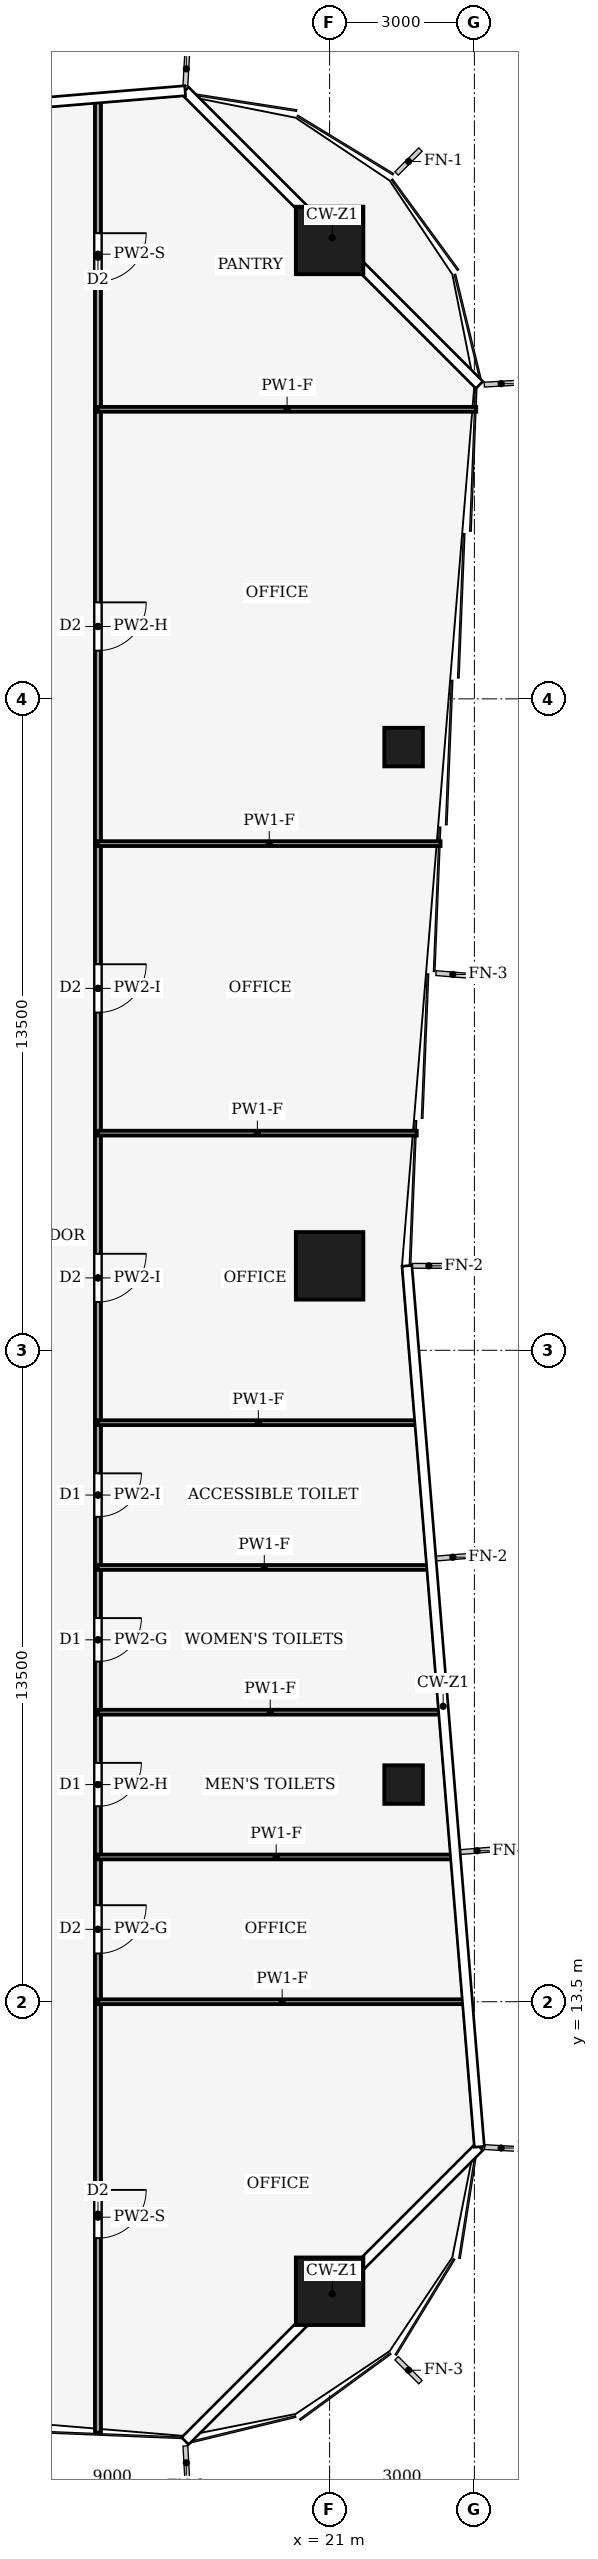
"""IFC4 building model, lengths in metres.
Left out: names, types, materials, properties, quantities, classifications, styles, units other than length and angle.
Written with IfcOpenShell. Run it as: python <this file> out.ifc"""

import sys

from ifc_helpers import new_model, si_unit, direction, frame, frame_2d, origin, origin_2d, place, context, subcontext, project, spatial, rectangle, hollow_rectangle, extrude, element, fill, save


model = new_model("IFC4")
c1 = context("Model", 3, precision=1e-05, world=origin(), true_north=direction((0.0, 1.0)))
c2 = subcontext(c1, "Body", "Model", "MODEL_VIEW")
j1 = project(units=[si_unit("LENGTHUNIT", "METRE"), si_unit("PLANEANGLEUNIT", "RADIAN")], contexts=[c1])
p1 = place(None, origin())
s1 = spatial("IfcSite", under=j1, at=p1, CompositionType="ELEMENT")
p2 = place(p1, origin())
s2 = spatial("IfcBuilding", under=s1, at=p2, CompositionType="ELEMENT")
p3 = place(p2, frame((0.0, 0.0, 82.0)))
s3 = spatial("IfcBuildingStorey", under=s2, at=p3, CompositionType="ELEMENT", Elevation=82.0)
for number, where, z_axis, x_axis in (
    (1, (21.0, 50.0, 0.0), (0.0, 0.0, 1.0), (1.0, 0.0, 0.0)),
    (2, (21.0, 28.75, 0.0), (0.0, 0.0, 1.0), (1.0, 0.0, 0.0)),
    (3, (21.0, 7.5, 0.0), (0.0, 0.0, 1.0), (1.0, 0.0, 0.0)),
):
    element("IfcColumn", number, at=place(p3, frame(where, z_axis=z_axis, x_axis=x_axis)), inside=s3, PredefinedType="COLUMN", context=c2, shape_type="SweptSolid", body=[
        extrude(hollow_rectangle(XDim=1.4, YDim=1.4, WallThickness=0.08, at=origin_2d()), origin(), (0.0, 0.0, 1.0), 4.0),
    ])
for number, where, z_axis, x_axis in (
    (4, (22.534, 18.0, 0.0), (0.0, 0.0, 1.0), (1.0, 0.0, 0.0)),
    (5, (22.534, 39.5, 0.0), (0.0, 0.0, 1.0), (1.0, 0.0, 0.0)),
):
    element("IfcColumn", number, at=place(p3, frame(where, z_axis=z_axis, x_axis=x_axis)), inside=s3, PredefinedType="COLUMN", context=c2, shape_type="SweptSolid", body=[
        extrude(hollow_rectangle(XDim=0.8, YDim=0.8, WallThickness=0.04, at=origin_2d()), origin(), (0.0, 0.0, 1.0), 4.0),
    ])
p4 = place(p3, frame((16.2, 13.5, 0.0), z_axis=(0.0, 0.0, 1.0), x_axis=(0.0, -1.0, 0.0)))
e6 = element("IfcWall", 6, at=p4, inside=s3, PredefinedType="PARTITIONING", context=c2, shape_type="SweptSolid", body=[
    extrude(rectangle(XDim=8.93, YDim=0.125, at=frame_2d((4.465, 0.0))), origin(), (0.0, 0.0, 1.0), 3.04),
])
p5 = place(p4, frame((3.9, 0.0, 0.0)))
e7 = element("IfcOpeningElement", 7, at=p5, cuts=e6, PredefinedType="OPENING", context=c2, shape_type="SweptSolid", body=[
    extrude(rectangle(XDim=1.0, YDim=2.1, at=frame_2d((0.5, 1.05))), frame((0.0, 0.073, 0.0), z_axis=(0.0, -1.0, 0.0), x_axis=(1.0, 0.0, 0.0)), (0.0, 0.0, 1.0), 0.145),
])
p6 = place(p3, frame((16.2, 16.5, 0.0), z_axis=(0.0, 0.0, 1.0), x_axis=(0.0, -1.0, 0.0)))
e8 = element("IfcWall", 8, at=p6, inside=s3, PredefinedType="PARTITIONING", context=c2, shape_type="SweptSolid", body=[
    extrude(rectangle(XDim=3.0, YDim=0.125, at=frame_2d((1.5, 0.0))), origin(), (0.0, 0.0, 1.0), 3.87),
])
p7 = place(p6, frame((1.0, 0.0, 0.0)))
e9 = element("IfcOpeningElement", 9, at=p7, cuts=e8, PredefinedType="OPENING", context=c2, shape_type="SweptSolid", body=[
    extrude(rectangle(XDim=1.0, YDim=2.1, at=frame_2d((0.5, 1.05))), frame((0.0, 0.073, 0.0), z_axis=(0.0, -1.0, 0.0), x_axis=(1.0, 0.0, 0.0)), (0.0, 0.0, 1.0), 0.145),
])
p8 = place(p3, frame((16.2, 19.5, 0.0), z_axis=(0.0, 0.0, 1.0), x_axis=(0.0, -1.0, 0.0)))
e10 = element("IfcWall", 10, at=p8, inside=s3, PredefinedType="PARTITIONING", context=c2, shape_type="SweptSolid", body=[
    extrude(rectangle(XDim=3.0, YDim=0.125, at=frame_2d((1.5, 0.0))), origin(), (0.0, 0.0, 1.0), 3.14),
])
p9 = place(p8, frame((1.05, 0.0, 0.0)))
e11 = element("IfcOpeningElement", 11, at=p9, cuts=e10, PredefinedType="OPENING", context=c2, shape_type="SweptSolid", body=[
    extrude(rectangle(XDim=0.9, YDim=2.1, at=frame_2d((0.45, 1.05))), frame((0.0, 0.073, 0.0), z_axis=(0.0, -1.0, 0.0), x_axis=(1.0, 0.0, 0.0)), (0.0, 0.0, 1.0), 0.145),
])
p10 = place(p3, frame((16.2, 22.5, 0.0), z_axis=(0.0, 0.0, 1.0), x_axis=(0.0, -1.0, 0.0)))
e12 = element("IfcWall", 12, at=p10, inside=s3, PredefinedType="PARTITIONING", context=c2, shape_type="SweptSolid", body=[
    extrude(rectangle(XDim=3.0, YDim=0.125, at=frame_2d((1.5, 0.0))), origin(), (0.0, 0.0, 1.0), 3.87),
])
p11 = place(p10, frame((1.05, 0.0, 0.0)))
e13 = element("IfcOpeningElement", 13, at=p11, cuts=e12, PredefinedType="OPENING", context=c2, shape_type="SweptSolid", body=[
    extrude(rectangle(XDim=0.9, YDim=2.1, at=frame_2d((0.45, 1.05))), frame((0.0, 0.073, 0.0), z_axis=(0.0, -1.0, 0.0), x_axis=(1.0, 0.0, 0.0)), (0.0, 0.0, 1.0), 0.145),
])
p12 = place(p3, frame((16.2, 25.5, 0.0), z_axis=(0.0, 0.0, 1.0), x_axis=(0.0, -1.0, 0.0)))
e14 = element("IfcWall", 14, at=p12, inside=s3, PredefinedType="PARTITIONING", context=c2, shape_type="SweptSolid", body=[
    extrude(rectangle(XDim=3.0, YDim=0.125, at=frame_2d((1.5, 0.0))), origin(), (0.0, 0.0, 1.0), 3.48),
])
p13 = place(p12, frame((1.05, 0.0, 0.0)))
e15 = element("IfcOpeningElement", 15, at=p13, cuts=e14, PredefinedType="OPENING", context=c2, shape_type="SweptSolid", body=[
    extrude(rectangle(XDim=0.9, YDim=2.1, at=frame_2d((0.45, 1.05))), frame((0.0, 0.073, 0.0), z_axis=(0.0, -1.0, 0.0), x_axis=(1.0, 0.0, 0.0)), (0.0, 0.0, 1.0), 0.145),
])
p14 = place(p3, frame((16.2, 31.5, 0.0), z_axis=(0.0, 0.0, 1.0), x_axis=(0.0, -1.0, 0.0)))
e16 = element("IfcWall", 16, at=p14, inside=s3, PredefinedType="PARTITIONING", context=c2, shape_type="SweptSolid", body=[
    extrude(rectangle(XDim=6.0, YDim=0.125, at=frame_2d((3.0, 0.0))), origin(), (0.0, 0.0, 1.0), 3.48),
])
p15 = place(p14, frame((2.5, 0.0, 0.0)))
e17 = element("IfcOpeningElement", 17, at=p15, cuts=e16, PredefinedType="OPENING", context=c2, shape_type="SweptSolid", body=[
    extrude(rectangle(XDim=1.0, YDim=2.1, at=frame_2d((0.5, 1.05))), frame((0.0, 0.073, 0.0), z_axis=(0.0, -1.0, 0.0), x_axis=(1.0, 0.0, 0.0)), (0.0, 0.0, 1.0), 0.145),
])
p16 = place(p3, frame((16.2, 37.5, 0.0), z_axis=(0.0, 0.0, 1.0), x_axis=(0.0, -1.0, 0.0)))
e18 = element("IfcWall", 18, at=p16, inside=s3, PredefinedType="PARTITIONING", context=c2, shape_type="SweptSolid", body=[
    extrude(rectangle(XDim=6.0, YDim=0.125, at=frame_2d((3.0, 0.0))), origin(), (0.0, 0.0, 1.0), 3.48),
])
p17 = place(p16, frame((2.5, 0.0, 0.0)))
e19 = element("IfcOpeningElement", 19, at=p17, cuts=e18, PredefinedType="OPENING", context=c2, shape_type="SweptSolid", body=[
    extrude(rectangle(XDim=1.0, YDim=2.1, at=frame_2d((0.5, 1.05))), frame((0.0, 0.073, 0.0), z_axis=(0.0, -1.0, 0.0), x_axis=(1.0, 0.0, 0.0)), (0.0, 0.0, 1.0), 0.145),
])
p18 = place(p3, frame((16.2, 46.5, 0.0), z_axis=(0.0, 0.0, 1.0), x_axis=(0.0, -1.0, 0.0)))
e20 = element("IfcWall", 20, at=p18, inside=s3, PredefinedType="PARTITIONING", context=c2, shape_type="SweptSolid", body=[
    extrude(rectangle(XDim=9.0, YDim=0.125, at=frame_2d((4.5, 0.0))), origin(), (0.0, 0.0, 1.0), 3.14),
])
p19 = place(p18, frame((4.0, 0.0, 0.0)))
e21 = element("IfcOpeningElement", 21, at=p19, cuts=e20, PredefinedType="OPENING", context=c2, shape_type="SweptSolid", body=[
    extrude(rectangle(XDim=1.0, YDim=2.1, at=frame_2d((0.5, 1.05))), frame((0.0, 0.073, 0.0), z_axis=(0.0, -1.0, 0.0), x_axis=(1.0, 0.0, 0.0)), (0.0, 0.0, 1.0), 0.145),
])
p20 = place(p3, frame((16.2, 52.93, 0.0), z_axis=(0.0, 0.0, 1.0), x_axis=(0.0, -1.0, 0.0)))
e22 = element("IfcWall", 22, at=p20, inside=s3, PredefinedType="PARTITIONING", context=c2, shape_type="SweptSolid", body=[
    extrude(rectangle(XDim=6.43, YDim=0.125, at=frame_2d((3.215, 0.0))), origin(), (0.0, 0.0, 1.0), 3.04),
])
p21 = place(p20, frame((2.78, 0.0, 0.0)))
e23 = element("IfcOpeningElement", 23, at=p21, cuts=e22, PredefinedType="OPENING", context=c2, shape_type="SweptSolid", body=[
    extrude(rectangle(XDim=1.0, YDim=2.1, at=frame_2d((0.5, 1.05))), frame((0.0, 0.073, 0.0), z_axis=(0.0, -1.0, 0.0), x_axis=(1.0, 0.0, 0.0)), (0.0, 0.0, 1.0), 0.145),
])
p22 = place(p3, frame((23.833, 13.5, 0.0), z_axis=(0.0, 0.0, 1.0), x_axis=(-1.0, 0.0, 0.0)))
e24 = element("IfcWall", 24, at=p22, inside=s3, PredefinedType="PARTITIONING", context=c2, shape_type="SweptSolid", body=[
    extrude(rectangle(XDim=7.634, YDim=0.1, at=frame_2d((3.817, 0.0))), origin(), (0.0, 0.0, 1.0), 3.04),
])
p23 = place(p3, frame((23.587, 16.5, 0.0), z_axis=(0.0, 0.0, 1.0), x_axis=(-1.0, 0.0, 0.0)))
e25 = element("IfcWall", 25, at=p23, inside=s3, PredefinedType="PARTITIONING", context=c2, shape_type="SweptSolid", body=[
    extrude(rectangle(XDim=7.387, YDim=0.1, at=frame_2d((3.693, 0.0))), origin(), (0.0, 0.0, 1.0), 3.04),
])
p24 = place(p3, frame((23.34, 19.5, 0.0), z_axis=(0.0, 0.0, 1.0), x_axis=(-1.0, 0.0, 0.0)))
e26 = element("IfcWall", 26, at=p24, inside=s3, PredefinedType="PARTITIONING", context=c2, shape_type="SweptSolid", body=[
    extrude(rectangle(XDim=7.14, YDim=0.1, at=frame_2d((3.57, 0.0))), origin(), (0.0, 0.0, 1.0), 3.04),
])
p25 = place(p3, frame((23.094, 22.5, 0.0), z_axis=(0.0, 0.0, 1.0), x_axis=(-1.0, 0.0, 0.0)))
e27 = element("IfcWall", 27, at=p25, inside=s3, PredefinedType="PARTITIONING", context=c2, shape_type="SweptSolid", body=[
    extrude(rectangle(XDim=6.894, YDim=0.1, at=frame_2d((3.447, 0.0))), origin(), (0.0, 0.0, 1.0), 3.04),
])
p26 = place(p3, frame((22.847, 25.5, 0.0), z_axis=(0.0, 0.0, 1.0), x_axis=(-1.0, 0.0, 0.0)))
e28 = element("IfcWall", 28, at=p26, inside=s3, PredefinedType="PARTITIONING", context=c2, shape_type="SweptSolid", body=[
    extrude(rectangle(XDim=6.647, YDim=0.1, at=frame_2d((3.324, 0.0))), origin(), (0.0, 0.0, 1.0), 3.04),
])
p27 = place(p3, frame((22.806, 31.5, 0.0), z_axis=(0.0, 0.0, 1.0), x_axis=(-1.0, 0.0, 0.0)))
e29 = element("IfcWall", 29, at=p27, inside=s3, PredefinedType="PARTITIONING", context=c2, shape_type="SweptSolid", body=[
    extrude(rectangle(XDim=6.606, YDim=0.1, at=frame_2d((3.303, 0.0))), origin(), (0.0, 0.0, 1.0), 3.04),
])
p28 = place(p3, frame((23.299, 37.5, 0.0), z_axis=(0.0, 0.0, 1.0), x_axis=(-1.0, 0.0, 0.0)))
e30 = element("IfcWall", 30, at=p28, inside=s3, PredefinedType="PARTITIONING", context=c2, shape_type="SweptSolid", body=[
    extrude(rectangle(XDim=7.099, YDim=0.1, at=frame_2d((3.55, 0.0))), origin(), (0.0, 0.0, 1.0), 3.04),
])
p29 = place(p3, frame((24.039, 46.5, 0.0), z_axis=(0.0, 0.0, 1.0), x_axis=(-1.0, 0.0, 0.0)))
e31 = element("IfcWall", 31, at=p29, inside=s3, PredefinedType="PARTITIONING", context=c2, shape_type="SweptSolid", body=[
    extrude(rectangle(XDim=7.839, YDim=0.1, at=frame_2d((3.919, 0.0))), origin(), (0.0, 0.0, 1.0), 3.04),
])
p30 = place(p5, origin())
e32 = element("IfcDoor", 32, at=p30, inside=s3, OperationType="SINGLE_SWING_LEFT", PredefinedType="DOOR", context=c2, shape_type="SweptSolid", body=[
    extrude(rectangle(XDim=1.0, YDim=2.1, at=frame_2d((0.5, 1.05))), frame((0.0, 0.025, 0.0), z_axis=(0.0, -1.0, 0.0), x_axis=(1.0, 0.0, 0.0)), (0.0, 0.0, 1.0), 0.05),
])
fill(e7, e32)
p31 = place(p7, origin())
e33 = element("IfcDoor", 33, at=p31, inside=s3, OperationType="SINGLE_SWING_LEFT", PredefinedType="DOOR", context=c2, shape_type="SweptSolid", body=[
    extrude(rectangle(XDim=1.0, YDim=2.1, at=frame_2d((0.5, 1.05))), frame((0.0, 0.025, 0.0), z_axis=(0.0, -1.0, 0.0), x_axis=(1.0, 0.0, 0.0)), (0.0, 0.0, 1.0), 0.05),
])
fill(e9, e33)
p32 = place(p9, origin())
e34 = element("IfcDoor", 34, at=p32, inside=s3, OperationType="SINGLE_SWING_RIGHT", PredefinedType="DOOR", context=c2, shape_type="SweptSolid", body=[
    extrude(rectangle(XDim=0.9, YDim=2.1, at=frame_2d((0.45, 1.05))), frame((0.0, 0.025, 0.0), z_axis=(0.0, -1.0, 0.0), x_axis=(1.0, 0.0, 0.0)), (0.0, 0.0, 1.0), 0.05),
])
fill(e11, e34)
p33 = place(p11, origin())
e35 = element("IfcDoor", 35, at=p33, inside=s3, OperationType="SINGLE_SWING_LEFT", PredefinedType="DOOR", context=c2, shape_type="SweptSolid", body=[
    extrude(rectangle(XDim=0.9, YDim=2.1, at=frame_2d((0.45, 1.05))), frame((0.0, 0.025, 0.0), z_axis=(0.0, -1.0, 0.0), x_axis=(1.0, 0.0, 0.0)), (0.0, 0.0, 1.0), 0.05),
])
fill(e13, e35)
p34 = place(p13, origin())
e36 = element("IfcDoor", 36, at=p34, inside=s3, OperationType="SINGLE_SWING_RIGHT", PredefinedType="DOOR", context=c2, shape_type="SweptSolid", body=[
    extrude(rectangle(XDim=0.9, YDim=2.1, at=frame_2d((0.45, 1.05))), frame((0.0, 0.025, 0.0), z_axis=(0.0, -1.0, 0.0), x_axis=(1.0, 0.0, 0.0)), (0.0, 0.0, 1.0), 0.05),
])
fill(e15, e36)
p35 = place(p15, origin())
e37 = element("IfcDoor", 37, at=p35, inside=s3, OperationType="SINGLE_SWING_LEFT", PredefinedType="DOOR", context=c2, shape_type="SweptSolid", body=[
    extrude(rectangle(XDim=1.0, YDim=2.1, at=frame_2d((0.5, 1.05))), frame((0.0, 0.025, 0.0), z_axis=(0.0, -1.0, 0.0), x_axis=(1.0, 0.0, 0.0)), (0.0, 0.0, 1.0), 0.05),
])
fill(e17, e37)
p36 = place(p17, origin())
e38 = element("IfcDoor", 38, at=p36, inside=s3, OperationType="SINGLE_SWING_RIGHT", PredefinedType="DOOR", context=c2, shape_type="SweptSolid", body=[
    extrude(rectangle(XDim=1.0, YDim=2.1, at=frame_2d((0.5, 1.05))), frame((0.0, 0.025, 0.0), z_axis=(0.0, -1.0, 0.0), x_axis=(1.0, 0.0, 0.0)), (0.0, 0.0, 1.0), 0.05),
])
fill(e19, e38)
p37 = place(p19, origin())
e39 = element("IfcDoor", 39, at=p37, inside=s3, OperationType="SINGLE_SWING_LEFT", PredefinedType="DOOR", context=c2, shape_type="SweptSolid", body=[
    extrude(rectangle(XDim=1.0, YDim=2.1, at=frame_2d((0.5, 1.05))), frame((0.0, 0.025, 0.0), z_axis=(0.0, -1.0, 0.0), x_axis=(1.0, 0.0, 0.0)), (0.0, 0.0, 1.0), 0.05),
])
fill(e21, e39)
p38 = place(p21, origin())
e40 = element("IfcDoor", 40, at=p38, inside=s3, OperationType="SINGLE_SWING_RIGHT", PredefinedType="DOOR", context=c2, shape_type="SweptSolid", body=[
    extrude(rectangle(XDim=1.0, YDim=2.1, at=frame_2d((0.5, 1.05))), frame((0.0, 0.025, 0.0), z_axis=(0.0, -1.0, 0.0), x_axis=(1.0, 0.0, 0.0)), (0.0, 0.0, 1.0), 0.05),
])
fill(e23, e40)
save(model, sys.argv[1])
